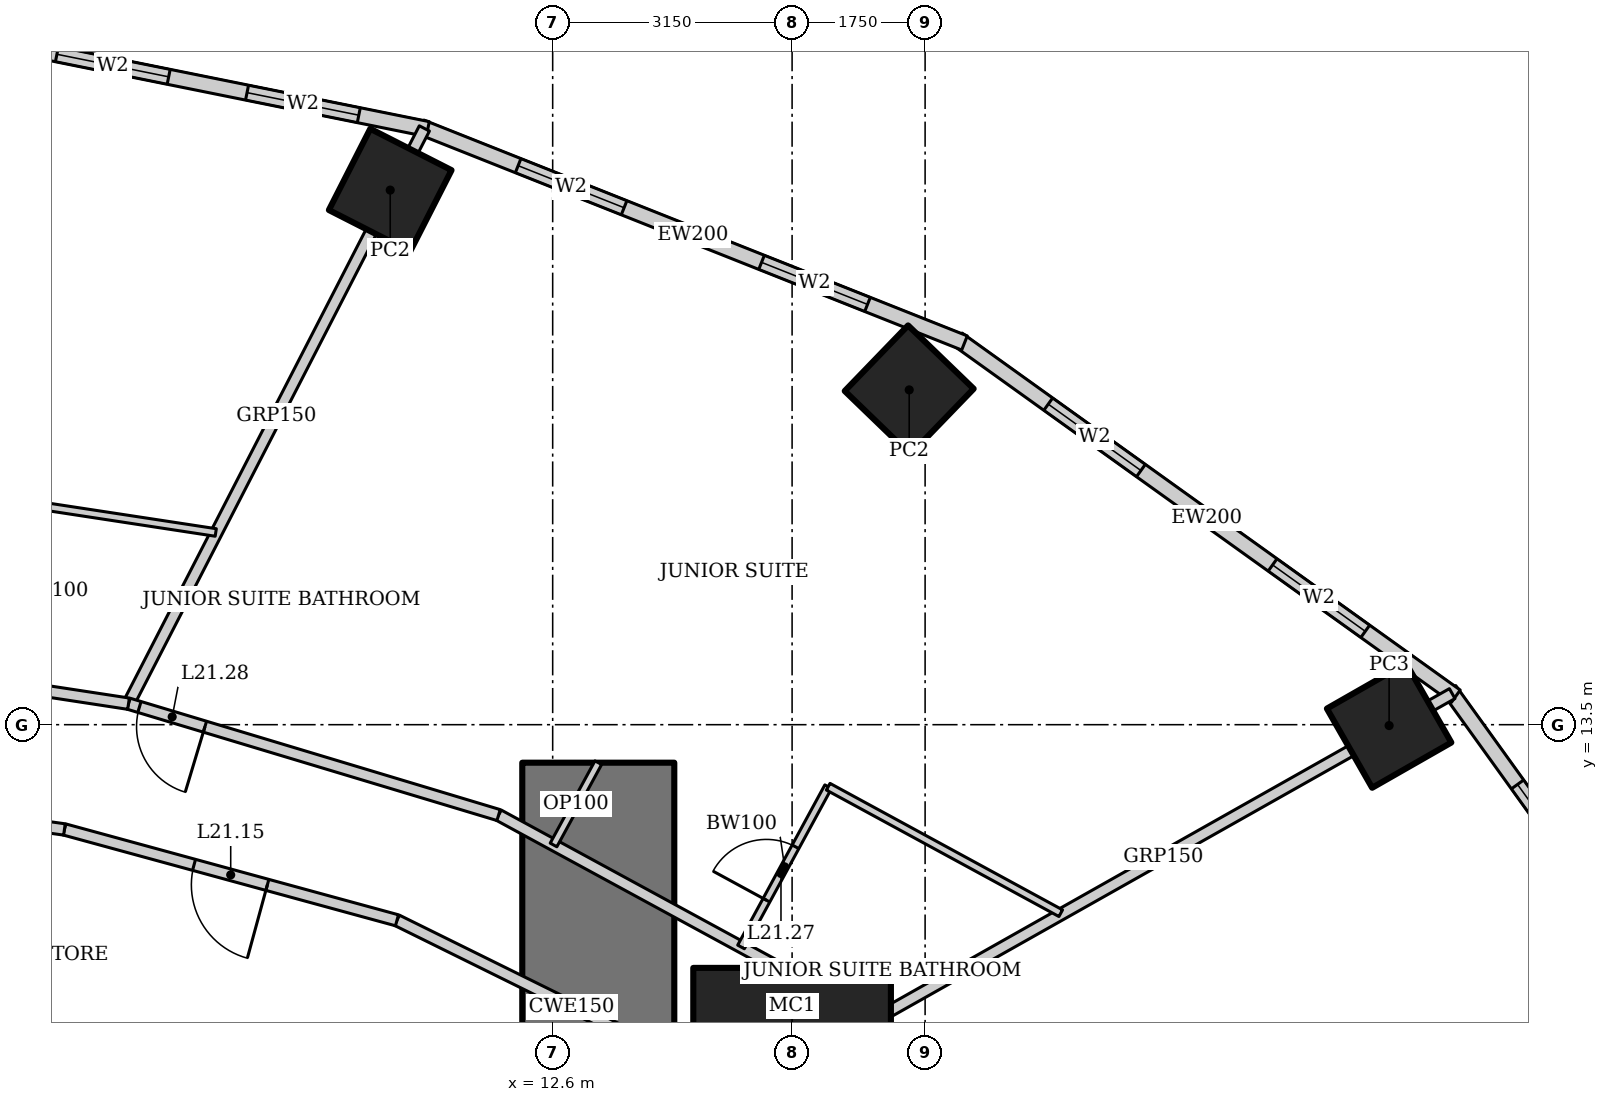
"""IFC4 building model, lengths in metres.
Left out: names, types, materials, properties, quantities, classifications, styles, units other than length and angle.
Written with IfcOpenShell. Run it as: python <this file> out.ifc"""

import sys

from ifc_helpers import new_model, si_unit, direction, frame, frame_2d, origin, origin_2d, place, context, subcontext, project, spatial, rectangle, hollow_rectangle, extrude, element, fill, save


model = new_model("IFC4")
c1 = context("Model", 3, precision=1e-05, world=origin(), true_north=direction((0.0, 1.0)))
c2 = subcontext(c1, "Body", "Model", "MODEL_VIEW")
j1 = project(units=[si_unit("LENGTHUNIT", "METRE"), si_unit("PLANEANGLEUNIT", "RADIAN")], contexts=[c1])
p1 = place(None, origin())
s1 = spatial("IfcSite", under=j1, at=p1, CompositionType="ELEMENT")
p2 = place(p1, origin())
s2 = spatial("IfcBuilding", under=s1, at=p2, CompositionType="ELEMENT")
p3 = place(p2, frame((0.0, 0.0, 91.0)))
s3 = spatial("IfcBuildingStorey", under=s2, at=p3, CompositionType="ELEMENT", Elevation=91.0)
p4 = place(p3, frame((15.75, 9.0, 0.0), z_axis=(0.0, 0.0, 1.0), x_axis=(1.0, 0.0, 0.0)))
e1 = element("IfcColumn", 1, at=p4, inside=s3, PredefinedType="COLUMN", context=c2, shape_type="SweptSolid", body=[
    extrude(hollow_rectangle(XDim=2.6, YDim=2.6, WallThickness=0.13, at=origin_2d()), origin(), (0.0, 0.0, 1.0), 3.6),
])
p5 = place(p3, frame((23.605, 13.489, 0.0), z_axis=(0.0, 0.0, 1.0), x_axis=(0.86824298017, 0.496139221777, 0.0)))
e2 = element("IfcColumn", 2, at=p5, inside=s3, PredefinedType="COLUMN", context=c2, shape_type="SweptSolid", body=[
    extrude(hollow_rectangle(XDim=1.2, YDim=1.2, WallThickness=0.12, at=origin_2d()), origin(), (0.0, 0.0, 1.0), 3.6),
])
for number, where, z_axis, x_axis in (
    (3, (17.291, 17.905, 0.0), (0.0, 0.0, 1.0), (0.695, 0.719, 0.0)),
    (4, (10.463, 20.534, 0.0), (0.0, 0.0, 1.0), (0.454, 0.891, 0.0)),
):
    element("IfcColumn", number, at=place(p3, frame(where, z_axis=z_axis, x_axis=x_axis)), inside=s3, PredefinedType="COLUMN", context=c2, shape_type="SweptSolid", body=[
        extrude(hollow_rectangle(XDim=1.2, YDim=1.2, WallThickness=0.1, at=origin_2d()), origin(), (0.0, 0.0, 1.0), 3.6),
    ])
p6 = place(p3, frame((13.2, -13.0, 0.0), z_axis=(0.0, 0.0, 1.0), x_axis=(0.0, 1.0, 0.0)))
e5 = element("IfcWall", 5, at=p6, inside=s3, PredefinedType="SHEAR", context=c2, shape_type="SweptSolid", body=[
    extrude(rectangle(XDim=26.0, YDim=2.0, at=frame_2d((13.0, 0.0))), origin(), (0.0, 0.0, 1.0), 3.6),
])
p7 = place(p6, frame((12.1, 0.0, 0.0)))
e6 = element("IfcOpeningElement", 6, at=p7, cuts=e5, PredefinedType="OPENING", context=c2, shape_type="SweptSolid", body=[
    extrude(rectangle(XDim=1.8, YDim=2.1, at=frame_2d((0.9, 1.05))), frame((0.0, 1.01, 0.0), z_axis=(0.0, -1.0, 0.0), x_axis=(1.0, 0.0, 0.0)), (0.0, 0.0, 1.0), 2.02),
])
p8 = place(p3, frame((29.26, 7.2, 0.0), z_axis=(0.0, 0.0, 1.0), x_axis=(-0.583937613703, 0.811798536155, 0.0)))
e7 = element("IfcWall", 7, at=p8, inside=s3, PredefinedType="SOLIDWALL", context=c2, shape_type="SweptSolid", body=[
    extrude(rectangle(XDim=8.323, YDim=0.2, at=frame_2d((4.162, 0.0))), origin(), (0.0, 0.0, 1.0), 3.45),
])
p9 = place(p8, frame((1.531, 0.0, 0.5)))
e8 = element("IfcOpeningElement", 8, at=p9, cuts=e7, PredefinedType="OPENING", context=c2, shape_type="SweptSolid", body=[
    extrude(rectangle(XDim=1.5, YDim=2.2, at=frame_2d((0.75, 1.1))), frame((0.0, 0.11, 0.0), z_axis=(0.0, -1.0, 0.0), x_axis=(1.0, 0.0, 0.0)), (0.0, 0.0, 1.0), 0.22),
])
p10 = place(p8, frame((5.292, 0.0, 0.5)))
e9 = element("IfcOpeningElement", 9, at=p10, cuts=e7, PredefinedType="OPENING", context=c2, shape_type="SweptSolid", body=[
    extrude(rectangle(XDim=1.5, YDim=2.2, at=frame_2d((0.75, 1.1))), frame((0.0, 0.11, 0.0), z_axis=(0.0, -1.0, 0.0), x_axis=(1.0, 0.0, 0.0)), (0.0, 0.0, 1.0), 0.22),
])
p11 = place(p3, frame((24.482, 13.875, 0.0), z_axis=(0.0, 0.0, 1.0), x_axis=(-0.812791321576, 0.582554948112, 0.0)))
e10 = element("IfcWall", 10, at=p11, inside=s3, PredefinedType="SOLIDWALL", context=c2, shape_type="SweptSolid", body=[
    extrude(rectangle(XDim=8.063, YDim=0.2, at=frame_2d((4.032, 0.0))), origin(), (0.0, 0.0, 1.0), 3.45),
])
p12 = place(p11, frame((1.466, 0.0, 0.5)))
e11 = element("IfcOpeningElement", 11, at=p12, cuts=e10, PredefinedType="OPENING", context=c2, shape_type="SweptSolid", body=[
    extrude(rectangle(XDim=1.5, YDim=2.2, at=frame_2d((0.75, 1.1))), frame((0.0, 0.11, 0.0), z_axis=(0.0, -1.0, 0.0), x_axis=(1.0, 0.0, 0.0)), (0.0, 0.0, 1.0), 0.22),
])
p13 = place(p11, frame((5.097, 0.0, 0.5)))
e12 = element("IfcOpeningElement", 12, at=p13, cuts=e10, PredefinedType="OPENING", context=c2, shape_type="SweptSolid", body=[
    extrude(rectangle(XDim=1.5, YDim=2.2, at=frame_2d((0.75, 1.1))), frame((0.0, 0.11, 0.0), z_axis=(0.0, -1.0, 0.0), x_axis=(1.0, 0.0, 0.0)), (0.0, 0.0, 1.0), 0.22),
])
p14 = place(p3, frame((18.018, 18.523, 0.0), z_axis=(0.0, 0.0, 1.0), x_axis=(-0.929358351251, 0.369178892895, 0.0)))
e13 = element("IfcWall", 13, at=p14, inside=s3, PredefinedType="SOLIDWALL", context=c2, shape_type="SweptSolid", body=[
    extrude(rectangle(XDim=7.692, YDim=0.2, at=frame_2d((3.846, 0.0))), origin(), (0.0, 0.0, 1.0), 3.45),
])
p15 = place(p14, frame((1.373, 0.0, 0.5)))
e14 = element("IfcOpeningElement", 14, at=p15, cuts=e13, PredefinedType="OPENING", context=c2, shape_type="SweptSolid", body=[
    extrude(rectangle(XDim=1.5, YDim=2.2, at=frame_2d((0.75, 1.1))), frame((0.0, 0.11, 0.0), z_axis=(0.0, -1.0, 0.0), x_axis=(1.0, 0.0, 0.0)), (0.0, 0.0, 1.0), 0.22),
])
p16 = place(p14, frame((4.819, 0.0, 0.5)))
e15 = element("IfcOpeningElement", 15, at=p16, cuts=e13, PredefinedType="OPENING", context=c2, shape_type="SweptSolid", body=[
    extrude(rectangle(XDim=1.5, YDim=2.2, at=frame_2d((0.75, 1.1))), frame((0.0, 0.11, 0.0), z_axis=(0.0, -1.0, 0.0), x_axis=(1.0, 0.0, 0.0)), (0.0, 0.0, 1.0), 0.22),
])
p17 = place(p3, frame((10.957, 21.337, 0.0), z_axis=(0.0, 0.0, 1.0), x_axis=(-0.980251657452, 0.197754110105, 0.0)))
e16 = element("IfcWall", 16, at=p17, inside=s3, PredefinedType="SOLIDWALL", context=c2, shape_type="SweptSolid", body=[
    extrude(rectangle(XDim=5.904, YDim=0.2, at=frame_2d((2.952, 0.0))), origin(), (0.0, 0.0, 1.0), 3.45),
])
p18 = place(p17, frame((0.926, 0.0, 0.5)))
e17 = element("IfcOpeningElement", 17, at=p18, cuts=e16, PredefinedType="OPENING", context=c2, shape_type="SweptSolid", body=[
    extrude(rectangle(XDim=1.5, YDim=2.2, at=frame_2d((0.75, 1.1))), frame((0.0, 0.11, 0.0), z_axis=(0.0, -1.0, 0.0), x_axis=(1.0, 0.0, 0.0)), (0.0, 0.0, 1.0), 0.22),
])
p19 = place(p17, frame((3.478, 0.0, 0.5)))
e18 = element("IfcOpeningElement", 18, at=p19, cuts=e16, PredefinedType="OPENING", context=c2, shape_type="SweptSolid", body=[
    extrude(rectangle(XDim=1.5, YDim=2.2, at=frame_2d((0.75, 1.1))), frame((0.0, 0.11, 0.0), z_axis=(0.0, -1.0, 0.0), x_axis=(1.0, 0.0, 0.0)), (0.0, 0.0, 1.0), 0.22),
])
p20 = place(p3, frame((24.435, 13.909, 0.0), z_axis=(0.0, 0.0, 1.0), x_axis=(-0.87090601027, -0.491449612143, 0.0)))
e19 = element("IfcWall", 19, at=p20, inside=s3, PredefinedType="PARTITIONING", context=c2, shape_type="SweptSolid", body=[
    extrude(rectangle(XDim=8.726, YDim=0.15, at=frame_2d((4.363, 0.0))), origin(), (0.0, 0.0, 1.0), 2.693),
])
p21 = place(p3, frame((10.912, 21.346, 0.0), z_axis=(0.0, 0.0, 1.0), x_axis=(-0.457327273085, -0.889298468059, 0.0)))
e20 = element("IfcWall", 20, at=p21, inside=s3, PredefinedType="PARTITIONING", context=c2, shape_type="SweptSolid", body=[
    extrude(rectangle(XDim=8.511, YDim=0.15, at=frame_2d((4.256, 0.0))), origin(), (0.0, 0.0, 1.0), 2.528),
])
p22 = place(p3, frame((20.984, 5.232, 0.0), z_axis=(0.0, 0.0, 1.0), x_axis=(-0.687062608696, 0.726598218916, 0.0)))
e21 = element("IfcWall", 21, at=p22, inside=s3, PredefinedType="PARTITIONING", context=c2, shape_type="SweptSolid", body=[
    extrude(rectangle(XDim=6.039, YDim=0.15, at=frame_2d((3.02, 0.0))), origin(), (0.0, 0.0, 1.0), 3.45),
])
p23 = place(p22, frame((0.15, 0.0, 0.0)))
e22 = element("IfcOpeningElement", 22, at=p23, cuts=e21, PredefinedType="OPENING", context=c2, shape_type="SweptSolid", body=[
    extrude(rectangle(XDim=0.9, YDim=2.1, at=frame_2d((0.45, 1.05))), frame((0.0, 0.085, 0.0), z_axis=(0.0, -1.0, 0.0), x_axis=(1.0, 0.0, 0.0)), (0.0, 0.0, 1.0), 0.17),
])
p24 = place(p3, frame((16.835, 9.62, 0.0), z_axis=(0.0, 0.0, 1.0), x_axis=(-0.878450059298, 0.477834169267, 0.0)))
e23 = element("IfcWall", 23, at=p24, inside=s3, PredefinedType="PARTITIONING", context=c2, shape_type="SweptSolid", body=[
    extrude(rectangle(XDim=5.631, YDim=0.15, at=frame_2d((2.815, 0.0))), origin(), (0.0, 0.0, 1.0), 3.45),
])
p25 = place(p3, frame((11.888, 12.311, 0.0), z_axis=(0.0, 0.0, 1.0), x_axis=(-0.957564241242, 0.288219922793, 0.0)))
e24 = element("IfcWall", 24, at=p25, inside=s3, PredefinedType="PARTITIONING", context=c2, shape_type="SweptSolid", body=[
    extrude(rectangle(XDim=5.085, YDim=0.15, at=frame_2d((2.542, 0.0))), origin(), (0.0, 0.0, 1.0), 3.45),
])
p26 = place(p25, frame((4.035, 0.0, 0.0)))
e25 = element("IfcOpeningElement", 25, at=p26, cuts=e24, PredefinedType="OPENING", context=c2, shape_type="SweptSolid", body=[
    extrude(rectangle(XDim=0.9, YDim=2.1, at=frame_2d((0.45, 1.05))), frame((0.0, 0.085, 0.0), z_axis=(0.0, -1.0, 0.0), x_axis=(1.0, 0.0, 0.0)), (0.0, 0.0, 1.0), 0.17),
])
p27 = place(p3, frame((7.019, 13.776, 0.0), z_axis=(0.0, 0.0, 1.0), x_axis=(-0.988564270062, 0.150800145746, 0.0)))
e26 = element("IfcWall", 26, at=p27, inside=s3, PredefinedType="PARTITIONING", context=c2, shape_type="SweptSolid", body=[
    extrude(rectangle(XDim=3.751, YDim=0.15, at=frame_2d((1.875, 0.0))), origin(), (0.0, 0.0, 1.0), 3.45),
])
p28 = place(p3, frame((15.147, 8.656, 0.0), z_axis=(0.0, 0.0, 1.0), x_axis=(-0.89656943448, 0.442903205177, 0.0)))
e27 = element("IfcWall", 27, at=p28, inside=s3, PredefinedType="PARTITIONING", context=c2, shape_type="SweptSolid", body=[
    extrude(rectangle(XDim=5.126, YDim=0.15, at=frame_2d((2.563, 0.0))), origin(), (0.0, 0.0, 1.0), 3.45),
])
p29 = place(p3, frame((10.551, 10.926, 0.0), z_axis=(0.0, 0.0, 1.0), x_axis=(-0.964644466646, 0.263554648923, 0.0)))
e28 = element("IfcWall", 28, at=p29, inside=s3, PredefinedType="PARTITIONING", context=c2, shape_type="SweptSolid", body=[
    extrude(rectangle(XDim=4.535, YDim=0.15, at=frame_2d((2.268, 0.0))), origin(), (0.0, 0.0, 1.0), 3.45),
])
p30 = place(p29, frame((1.768, 0.0, 0.0)))
e29 = element("IfcOpeningElement", 29, at=p30, cuts=e28, PredefinedType="OPENING", context=c2, shape_type="SweptSolid", body=[
    extrude(rectangle(XDim=1.0, YDim=2.1, at=frame_2d((0.5, 1.05))), frame((0.0, 0.085, 0.0), z_axis=(0.0, -1.0, 0.0), x_axis=(1.0, 0.0, 0.0)), (0.0, 0.0, 1.0), 0.17),
])
p31 = place(p3, frame((6.176, 12.122, 0.0), z_axis=(0.0, 0.0, 1.0), x_axis=(-0.990563451353, 0.137054911782, 0.0)))
e30 = element("IfcWall", 30, at=p31, inside=s3, PredefinedType="PARTITIONING", context=c2, shape_type="SweptSolid", body=[
    extrude(rectangle(XDim=3.304, YDim=0.15, at=frame_2d((1.652, 0.0))), origin(), (0.0, 0.0, 1.0), 3.45),
])
p32 = place(p3, frame((15.078, 10.576, 0.0), z_axis=(0.0, 0.0, 1.0), x_axis=(0.477832549678, 0.878450940274, 0.0)))
e31 = element("IfcWall", 31, at=p32, inside=s3, PredefinedType="PARTITIONING", context=c2, shape_type="SweptSolid", body=[
    extrude(rectangle(XDim=2.4, YDim=0.1, at=frame_2d((1.2, 0.0))), origin(), (0.0, 0.0, 1.0), 3.45),
])
p33 = place(p32, frame((0.7, 0.0, 0.0)))
e32 = element("IfcOpeningElement", 32, at=p33, cuts=e31, PredefinedType="OPENING", context=c2, shape_type="SweptSolid", body=[
    extrude(rectangle(XDim=0.8, YDim=2.1, at=frame_2d((0.4, 1.05))), frame((0.0, 0.06, 0.0), z_axis=(0.0, -1.0, 0.0), x_axis=(1.0, 0.0, 0.0)), (0.0, 0.0, 1.0), 0.12),
])
p34 = place(p3, frame((16.225, 12.684, 0.0), z_axis=(0.0, 0.0, 1.0), x_axis=(0.878473578893, -0.477790928322, 0.0)))
e33 = element("IfcWall", 33, at=p34, inside=s3, PredefinedType="PARTITIONING", context=c2, shape_type="SweptSolid", body=[
    extrude(rectangle(XDim=3.483, YDim=0.1, at=frame_2d((1.741, 0.0))), origin(), (0.0, 0.0, 1.0), 3.45),
])
p35 = place(p3, frame((5.404, 16.45, 0.0), z_axis=(0.0, 0.0, 1.0), x_axis=(0.988568792086, -0.150770498819, 0.0)))
e34 = element("IfcWall", 34, at=p35, inside=s3, PredefinedType="PARTITIONING", context=c2, shape_type="SweptSolid", body=[
    extrude(rectangle(XDim=2.795, YDim=0.1, at=frame_2d((1.397, 0.0))), origin(), (0.0, 0.0, 1.0), 3.45),
])
p36 = place(p3, frame((13.2, 13.0, 0.0), z_axis=(0.0, 0.0, 1.0), x_axis=(-0.477852414256, -0.878440134665, 0.0)))
e35 = element("IfcWall", 35, at=p36, inside=s3, PredefinedType="PARTITIONING", context=c2, shape_type="SweptSolid", body=[
    extrude(rectangle(XDim=1.232, YDim=0.1, at=frame_2d((0.616, 0.0))), origin(), (0.0, 0.0, 1.0), 3.45),
])
p37 = place(p10, origin())
e36 = element("IfcWindow", 36, at=p37, inside=s3, PartitioningType="SINGLE_PANEL", PredefinedType="WINDOW", context=c2, shape_type="SweptSolid", body=[
    extrude(rectangle(XDim=1.5, YDim=2.2, at=frame_2d((0.75, 1.1))), frame((0.0, 0.03, 0.0), z_axis=(0.0, -1.0, 0.0), x_axis=(1.0, 0.0, 0.0)), (0.0, 0.0, 1.0), 0.06),
])
fill(e9, e36)
p38 = place(p12, origin())
e37 = element("IfcWindow", 37, at=p38, inside=s3, PartitioningType="SINGLE_PANEL", PredefinedType="WINDOW", context=c2, shape_type="SweptSolid", body=[
    extrude(rectangle(XDim=1.5, YDim=2.2, at=frame_2d((0.75, 1.1))), frame((0.0, 0.03, 0.0), z_axis=(0.0, -1.0, 0.0), x_axis=(1.0, 0.0, 0.0)), (0.0, 0.0, 1.0), 0.06),
])
fill(e11, e37)
p39 = place(p13, origin())
e38 = element("IfcWindow", 38, at=p39, inside=s3, PartitioningType="SINGLE_PANEL", PredefinedType="WINDOW", context=c2, shape_type="SweptSolid", body=[
    extrude(rectangle(XDim=1.5, YDim=2.2, at=frame_2d((0.75, 1.1))), frame((0.0, 0.03, 0.0), z_axis=(0.0, -1.0, 0.0), x_axis=(1.0, 0.0, 0.0)), (0.0, 0.0, 1.0), 0.06),
])
fill(e12, e38)
p40 = place(p15, origin())
e39 = element("IfcWindow", 39, at=p40, inside=s3, PartitioningType="SINGLE_PANEL", PredefinedType="WINDOW", context=c2, shape_type="SweptSolid", body=[
    extrude(rectangle(XDim=1.5, YDim=2.2, at=frame_2d((0.75, 1.1))), frame((0.0, 0.03, 0.0), z_axis=(0.0, -1.0, 0.0), x_axis=(1.0, 0.0, 0.0)), (0.0, 0.0, 1.0), 0.06),
])
fill(e14, e39)
p41 = place(p16, origin())
e40 = element("IfcWindow", 40, at=p41, inside=s3, PartitioningType="SINGLE_PANEL", PredefinedType="WINDOW", context=c2, shape_type="SweptSolid", body=[
    extrude(rectangle(XDim=1.5, YDim=2.2, at=frame_2d((0.75, 1.1))), frame((0.0, 0.03, 0.0), z_axis=(0.0, -1.0, 0.0), x_axis=(1.0, 0.0, 0.0)), (0.0, 0.0, 1.0), 0.06),
])
fill(e15, e40)
p42 = place(p18, origin())
e41 = element("IfcWindow", 41, at=p42, inside=s3, PartitioningType="SINGLE_PANEL", PredefinedType="WINDOW", context=c2, shape_type="SweptSolid", body=[
    extrude(rectangle(XDim=1.5, YDim=2.2, at=frame_2d((0.75, 1.1))), frame((0.0, 0.03, 0.0), z_axis=(0.0, -1.0, 0.0), x_axis=(1.0, 0.0, 0.0)), (0.0, 0.0, 1.0), 0.06),
])
fill(e17, e41)
p43 = place(p19, origin())
e42 = element("IfcWindow", 42, at=p43, inside=s3, PartitioningType="SINGLE_PANEL", PredefinedType="WINDOW", context=c2, shape_type="SweptSolid", body=[
    extrude(rectangle(XDim=1.5, YDim=2.2, at=frame_2d((0.75, 1.1))), frame((0.0, 0.03, 0.0), z_axis=(0.0, -1.0, 0.0), x_axis=(1.0, 0.0, 0.0)), (0.0, 0.0, 1.0), 0.06),
])
fill(e18, e42)
p44 = place(p30, origin())
e43 = element("IfcDoor", 43, at=p44, inside=s3, OperationType="SINGLE_SWING_LEFT", PredefinedType="DOOR", context=c2, shape_type="SweptSolid", body=[
    extrude(rectangle(XDim=1.0, YDim=2.1, at=frame_2d((0.5, 1.05))), frame((0.0, 0.025, 0.0), z_axis=(0.0, -1.0, 0.0), x_axis=(1.0, 0.0, 0.0)), (0.0, 0.0, 1.0), 0.05),
])
fill(e29, e43)
p45 = place(p33, origin())
e44 = element("IfcDoor", 44, at=p45, inside=s3, OperationType="SINGLE_SWING_LEFT", PredefinedType="DOOR", context=c2, shape_type="SweptSolid", body=[
    extrude(rectangle(XDim=0.8, YDim=2.1, at=frame_2d((0.4, 1.05))), frame((0.0, 0.025, 0.0), z_axis=(0.0, -1.0, 0.0), x_axis=(1.0, 0.0, 0.0)), (0.0, 0.0, 1.0), 0.05),
])
fill(e32, e44)
p46 = place(p26, origin())
e45 = element("IfcDoor", 45, at=p46, inside=s3, OperationType="SINGLE_SWING_LEFT", PredefinedType="DOOR", context=c2, shape_type="SweptSolid", body=[
    extrude(rectangle(XDim=0.9, YDim=2.1, at=frame_2d((0.45, 1.05))), frame((0.0, 0.025, 0.0), z_axis=(0.0, -1.0, 0.0), x_axis=(1.0, 0.0, 0.0)), (0.0, 0.0, 1.0), 0.05),
])
fill(e25, e45)
save(model, sys.argv[1])
